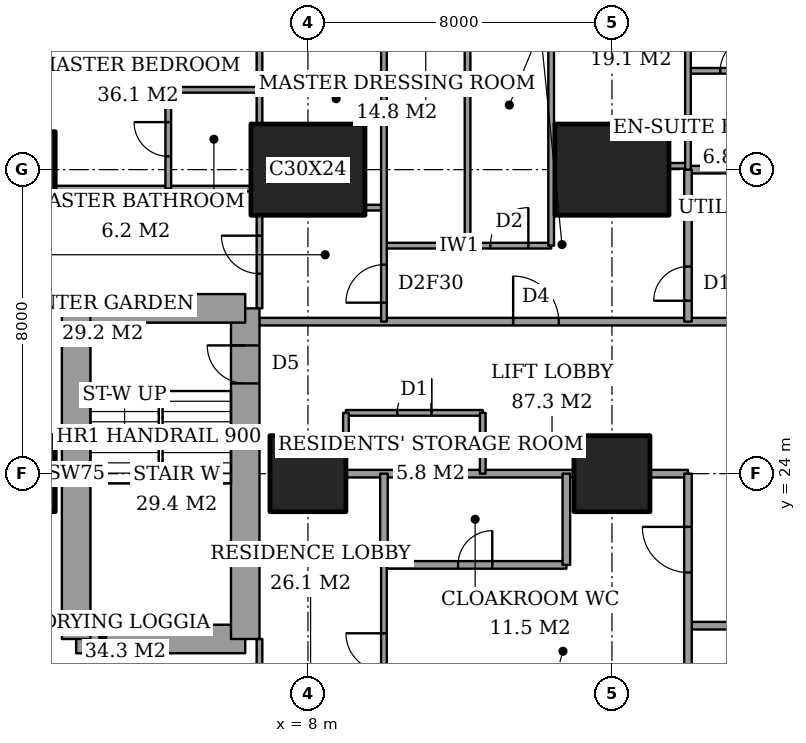
"""IFC4 building model, lengths in metres.
Left out: names, types, materials, properties, quantities, classifications, styles, units other than length and angle.
Written with IfcOpenShell. Run it as: python <this file> out.ifc"""

import sys

from ifc_helpers import new_model, si_unit, direction, frame, frame_2d, origin, origin_2d, place, context, subcontext, project, spatial, rectangle, extrude, element, fill, save


model = new_model("IFC4")
c1 = context("Model", 3, precision=1e-05, world=origin(), true_north=direction((0.0, 1.0)))
c2 = subcontext(c1, "Body", "Model", "MODEL_VIEW")
j1 = project(units=[si_unit("LENGTHUNIT", "METRE"), si_unit("PLANEANGLEUNIT", "RADIAN")], contexts=[c1])
p1 = place(None, origin())
s1 = spatial("IfcSite", under=j1, at=p1, CompositionType="ELEMENT")
p2 = place(p1, origin())
s2 = spatial("IfcBuilding", under=s1, at=p2, CompositionType="ELEMENT")
p3 = place(p2, frame((0.0, 0.0, 153.8)))
s3 = spatial("IfcBuildingStorey", under=s2, at=p3, CompositionType="ELEMENT", Elevation=153.8)
for number, where, z_axis, x_axis in (
    (1, (0.35, 24.0, 0.0), (0.0, 0.0, 1.0), (1.0, 0.0, 0.0)),
    (2, (0.35, 32.0, 0.0), (0.0, 0.0, 1.0), (1.0, 0.0, 0.0)),
    (3, (8.0, 24.0, 0.0), (0.0, 0.0, 1.0), (1.0, 0.0, 0.0)),
):
    element("IfcColumn", number, at=place(p3, frame(where, z_axis=z_axis, x_axis=x_axis)), inside=s3, PredefinedType="COLUMN", context=c2, shape_type="SweptSolid", body=[
        extrude(rectangle(XDim=2.0, YDim=2.0, at=origin_2d()), origin(), (0.0, 0.0, 1.0), 3.6),
    ])
p4 = place(p3, frame((8.0, 32.0, 0.0), z_axis=(0.0, 0.0, 1.0), x_axis=(1.0, 0.0, 0.0)))
e4 = element("IfcColumn", 4, at=p4, inside=s3, PredefinedType="COLUMN", context=c2, shape_type="SweptSolid", body=[
    extrude(rectangle(XDim=3.0, YDim=2.4, at=origin_2d()), origin(), (0.0, 0.0, 1.0), 3.6),
])
p5 = place(p3, frame((16.0, 24.0, 0.0), z_axis=(0.0, 0.0, 1.0), x_axis=(1.0, 0.0, 0.0)))
e5 = element("IfcColumn", 5, at=p5, inside=s3, PredefinedType="COLUMN", context=c2, shape_type="SweptSolid", body=[
    extrude(rectangle(XDim=2.0, YDim=2.0, at=origin_2d()), origin(), (0.0, 0.0, 1.0), 3.6),
])
p6 = place(p3, frame((16.0, 32.0, 0.0), z_axis=(0.0, 0.0, 1.0), x_axis=(1.0, 0.0, 0.0)))
e6 = element("IfcColumn", 6, at=p6, inside=s3, PredefinedType="COLUMN", context=c2, shape_type="SweptSolid", body=[
    extrude(rectangle(XDim=3.0, YDim=2.4, at=origin_2d()), origin(), (0.0, 0.0, 1.0), 3.6),
])
p7 = place(p3, frame((1.9, 19.65, 0.0), z_axis=(0.0, 0.0, 1.0), x_axis=(1.0, 0.0, 0.0)))
e7 = element("IfcWall", 7, at=p7, inside=s3, PredefinedType="SHEAR", context=c2, shape_type="SweptSolid", body=[
    extrude(rectangle(XDim=4.45, YDim=0.75, at=frame_2d((2.225, 0.0))), origin(), (0.0, 0.0, 1.0), 3.6),
])
p8 = place(p3, frame((6.35, 19.65, 0.0), z_axis=(0.0, 0.0, 1.0), x_axis=(0.0, 1.0, 0.0)))
e8 = element("IfcWall", 8, at=p8, inside=s3, PredefinedType="SHEAR", context=c2, shape_type="SweptSolid", body=[
    extrude(rectangle(XDim=8.7, YDim=0.75, at=frame_2d((4.35, 0.0))), origin(), (0.0, 0.0, 1.0), 3.6),
])
p9 = place(p8, frame((6.725, 0.0, 0.0)))
e9 = element("IfcOpeningElement", 9, at=p9, cuts=e8, PredefinedType="OPENING", context=c2, shape_type="SweptSolid", body=[
    extrude(rectangle(XDim=1.0, YDim=2.1, at=frame_2d((0.5, 1.05))), frame((0.0, 0.385, 0.0), z_axis=(0.0, -1.0, 0.0), x_axis=(1.0, 0.0, 0.0)), (0.0, 0.0, 1.0), 0.77),
])
p10 = place(p3, frame((6.35, 28.35, 0.0), z_axis=(0.0, 0.0, 1.0), x_axis=(-1.0, 0.0, 0.0)))
e10 = element("IfcWall", 10, at=p10, inside=s3, PredefinedType="SHEAR", context=c2, shape_type="SweptSolid", body=[
    extrude(rectangle(XDim=4.45, YDim=0.75, at=frame_2d((2.225, 0.0))), origin(), (0.0, 0.0, 1.0), 3.6),
])
p11 = place(p3, frame((1.9, 28.35, 0.0), z_axis=(0.0, 0.0, 1.0), x_axis=(0.0, -1.0, 0.0)))
e11 = element("IfcWall", 11, at=p11, inside=s3, PredefinedType="SHEAR", context=c2, shape_type="SweptSolid", body=[
    extrude(rectangle(XDim=8.7, YDim=0.75, at=frame_2d((4.35, 0.0))), origin(), (0.0, 0.0, 1.0), 3.6),
])
p12 = place(p3, frame((18.0, 20.0, 0.0), z_axis=(0.0, 0.0, 1.0), x_axis=(1.0, 0.0, 0.0)))
e12 = element("IfcWall", 12, at=p12, inside=s3, PredefinedType="PARTITIONING", context=c2, shape_type="SweptSolid", body=[
    extrude(rectangle(XDim=6.0, YDim=0.2, at=frame_2d((3.0, 0.0))), origin(), (0.0, 0.0, 1.0), 3.35),
])
p13 = place(p3, frame((10.0, 21.6, 0.0), z_axis=(0.0, 0.0, 1.0), x_axis=(1.0, 0.0, 0.0)))
e13 = element("IfcWall", 13, at=p13, inside=s3, PredefinedType="PARTITIONING", context=c2, shape_type="SweptSolid", body=[
    extrude(rectangle(XDim=4.8, YDim=0.2, at=frame_2d((2.4, 0.0))), origin(), (0.0, 0.0, 1.0), 3.35),
])
p14 = place(p13, frame((1.95, 0.0, 0.0)))
e14 = element("IfcOpeningElement", 14, at=p14, cuts=e13, PredefinedType="OPENING", context=c2, shape_type="SweptSolid", body=[
    extrude(rectangle(XDim=0.9, YDim=2.1, at=frame_2d((0.45, 1.05))), frame((0.0, 0.11, 0.0), z_axis=(0.0, -1.0, 0.0), x_axis=(1.0, 0.0, 0.0)), (0.0, 0.0, 1.0), 0.22),
])
p15 = place(p3, frame((9.0, 24.0, 0.0), z_axis=(0.0, 0.0, 1.0), x_axis=(1.0, 0.0, 0.0)))
e15 = element("IfcWall", 15, at=p15, inside=s3, PredefinedType="PARTITIONING", context=c2, shape_type="SweptSolid", body=[
    extrude(rectangle(XDim=6.0, YDim=0.2, at=frame_2d((3.0, 0.0))), origin(), (0.0, 0.0, 1.0), 3.35),
])
p16 = place(p3, frame((17.0, 24.0, 0.0), z_axis=(0.0, 0.0, 1.0), x_axis=(1.0, 0.0, 0.0)))
e16 = element("IfcWall", 16, at=p16, inside=s3, PredefinedType="PARTITIONING", context=c2, shape_type="SweptSolid", body=[
    extrude(rectangle(XDim=1.0, YDim=0.2, at=frame_2d((0.5, 0.0))), origin(), (0.0, 0.0, 1.0), 3.35),
])
p17 = place(p3, frame((9.0, 25.6, 0.0), z_axis=(0.0, 0.0, 1.0), x_axis=(1.0, 0.0, 0.0)))
e17 = element("IfcWall", 17, at=p17, inside=s3, PredefinedType="PARTITIONING", context=c2, shape_type="SweptSolid", body=[
    extrude(rectangle(XDim=3.6, YDim=0.15, at=frame_2d((1.8, 0.0))), origin(), (0.0, 0.0, 1.0), 3.35),
])
p18 = place(p17, frame((1.35, 0.0, 0.0)))
e18 = element("IfcOpeningElement", 18, at=p18, cuts=e17, PredefinedType="OPENING", context=c2, shape_type="SweptSolid", body=[
    extrude(rectangle(XDim=0.9, YDim=2.1, at=frame_2d((0.45, 1.05))), frame((0.0, 0.085, 0.0), z_axis=(0.0, -1.0, 0.0), x_axis=(1.0, 0.0, 0.0)), (0.0, 0.0, 1.0), 0.17),
])
p19 = place(p3, frame((6.725, 28.0, 0.0), z_axis=(0.0, 0.0, 1.0), x_axis=(1.0, 0.0, 0.0)))
e19 = element("IfcWall", 19, at=p19, inside=s3, PredefinedType="PARTITIONING", context=c2, shape_type="SweptSolid", body=[
    extrude(rectangle(XDim=17.275, YDim=0.2, at=frame_2d((8.637, 0.0))), origin(), (0.0, 0.0, 1.0), 3.35),
])
p20 = place(p19, frame((6.675, 0.0, 0.0)))
e20 = element("IfcOpeningElement", 20, at=p20, cuts=e19, PredefinedType="OPENING", context=c2, shape_type="SweptSolid", body=[
    extrude(rectangle(XDim=1.2, YDim=2.4, at=frame_2d((0.6, 1.2))), frame((0.0, 0.11, 0.0), z_axis=(0.0, -1.0, 0.0), x_axis=(1.0, 0.0, 0.0)), (0.0, 0.0, 1.0), 0.22),
])
p21 = place(p3, frame((10.0, 30.0, 0.0), z_axis=(0.0, 0.0, 1.0), x_axis=(1.0, 0.0, 0.0)))
e21 = element("IfcWall", 21, at=p21, inside=s3, PredefinedType="PARTITIONING", context=c2, shape_type="SweptSolid", body=[
    extrude(rectangle(XDim=4.4, YDim=0.15, at=frame_2d((2.2, 0.0))), origin(), (0.0, 0.0, 1.0), 3.35),
])
p22 = place(p21, frame((2.8, 0.0, 0.0)))
e22 = element("IfcOpeningElement", 22, at=p22, cuts=e21, PredefinedType="OPENING", context=c2, shape_type="SweptSolid", body=[
    extrude(rectangle(XDim=1.0, YDim=2.1, at=frame_2d((0.5, 1.05))), frame((0.0, 0.085, 0.0), z_axis=(0.0, -1.0, 0.0), x_axis=(1.0, 0.0, 0.0)), (0.0, 0.0, 1.0), 0.17),
])
p23 = place(p3, frame((9.5, 31.0, 0.0), z_axis=(0.0, 0.0, 1.0), x_axis=(1.0, 0.0, 0.0)))
e23 = element("IfcWall", 23, at=p23, inside=s3, PredefinedType="PARTITIONING", context=c2, shape_type="SweptSolid", body=[
    extrude(rectangle(XDim=0.5, YDim=0.15, at=frame_2d((0.25, 0.0))), origin(), (0.0, 0.0, 1.0), 3.35),
])
p24 = place(p3, frame((1.35, 31.5, 0.0), z_axis=(0.0, 0.0, 1.0), x_axis=(1.0, 0.0, 0.0)))
e24 = element("IfcWall", 24, at=p24, inside=s3, PredefinedType="PARTITIONING", context=c2, shape_type="SweptSolid", body=[
    extrude(rectangle(XDim=5.15, YDim=0.15, at=frame_2d((2.575, 0.0))), origin(), (0.0, 0.0, 1.0), 3.35),
])
p25 = place(p3, frame((18.0, 32.0, 0.0), z_axis=(0.0, 0.0, 1.0), x_axis=(1.0, 0.0, 0.0)))
e25 = element("IfcWall", 25, at=p25, inside=s3, PredefinedType="PARTITIONING", context=c2, shape_type="SweptSolid", body=[
    extrude(rectangle(XDim=6.0, YDim=0.2, at=frame_2d((3.0, 0.0))), origin(), (0.0, 0.0, 1.0), 2.634),
])
p26 = place(p3, frame((17.5, 32.1, 0.0), z_axis=(0.0, 0.0, 1.0), x_axis=(1.0, 0.0, 0.0)))
e26 = element("IfcWall", 26, at=p26, inside=s3, PredefinedType="PARTITIONING", context=c2, shape_type="SweptSolid", body=[
    extrude(rectangle(XDim=0.5, YDim=0.15, at=frame_2d((0.25, 0.0))), origin(), (0.0, 0.0, 1.0), 2.634),
])
p27 = place(p3, frame((4.325, 34.1, 0.0), z_axis=(0.0, 0.0, 1.0), x_axis=(1.0, 0.0, 0.0)))
e27 = element("IfcWall", 27, at=p27, inside=s3, PredefinedType="PARTITIONING", context=c2, shape_type="SweptSolid", body=[
    extrude(rectangle(XDim=2.4, YDim=0.15, at=frame_2d((1.2, 0.0))), origin(), (0.0, 0.0, 1.0), 3.35),
])
p28 = place(p3, frame((18.0, 34.6, 0.0), z_axis=(0.0, 0.0, 1.0), x_axis=(1.0, 0.0, 0.0)))
e28 = element("IfcWall", 28, at=p28, inside=s3, PredefinedType="PARTITIONING", context=c2, shape_type="SweptSolid", body=[
    extrude(rectangle(XDim=2.6, YDim=0.15, at=frame_2d((1.3, 0.0))), origin(), (0.0, 0.0, 1.0), 3.35),
])
p29 = place(p28, frame((0.85, 0.0, 0.0)))
e29 = element("IfcOpeningElement", 29, at=p29, cuts=e28, PredefinedType="OPENING", context=c2, shape_type="SweptSolid", body=[
    extrude(rectangle(XDim=0.9, YDim=2.1, at=frame_2d((0.45, 1.05))), frame((0.0, 0.085, 0.0), z_axis=(0.0, -1.0, 0.0), x_axis=(1.0, 0.0, 0.0)), (0.0, 0.0, 1.0), 0.17),
])
p30 = place(p3, frame((4.325, 31.5, 0.0), z_axis=(0.0, 0.0, 1.0), x_axis=(0.0, 1.0, 0.0)))
e30 = element("IfcWall", 30, at=p30, inside=s3, PredefinedType="PARTITIONING", context=c2, shape_type="SweptSolid", body=[
    extrude(rectangle(XDim=2.6, YDim=0.15, at=frame_2d((1.3, 0.0))), origin(), (0.0, 0.0, 1.0), 3.35),
])
p31 = place(p30, frame((0.85, 0.0, 0.0)))
e31 = element("IfcOpeningElement", 31, at=p31, cuts=e30, PredefinedType="OPENING", context=c2, shape_type="SweptSolid", body=[
    extrude(rectangle(XDim=0.9, YDim=2.1, at=frame_2d((0.45, 1.05))), frame((0.0, 0.085, 0.0), z_axis=(0.0, -1.0, 0.0), x_axis=(1.0, 0.0, 0.0)), (0.0, 0.0, 1.0), 0.17),
])
p32 = place(p3, frame((6.725, 17.2, 0.0), z_axis=(0.0, 0.0, 1.0), x_axis=(0.0, 1.0, 0.0)))
e32 = element("IfcWall", 32, at=p32, inside=s3, PredefinedType="PARTITIONING", context=c2, shape_type="SweptSolid", body=[
    extrude(rectangle(XDim=2.45, YDim=0.15, at=frame_2d((1.225, 0.0))), origin(), (0.0, 0.0, 1.0), 3.35),
])
p33 = place(p32, frame((0.587, 0.0, 0.0)))
e33 = element("IfcOpeningElement", 33, at=p33, cuts=e32, PredefinedType="OPENING", context=c2, shape_type="SweptSolid", body=[
    extrude(rectangle(XDim=0.9, YDim=2.1, at=frame_2d((0.45, 1.05))), frame((0.0, 0.085, 0.0), z_axis=(0.0, -1.0, 0.0), x_axis=(1.0, 0.0, 0.0)), (0.0, 0.0, 1.0), 0.17),
])
p34 = place(p3, frame((6.725, 28.35, 0.0), z_axis=(0.0, 0.0, 1.0), x_axis=(0.0, 1.0, 0.0)))
e34 = element("IfcWall", 34, at=p34, inside=s3, PredefinedType="PARTITIONING", context=c2, shape_type="SweptSolid", body=[
    extrude(rectangle(XDim=2.45, YDim=0.15, at=frame_2d((1.225, 0.0))), origin(), (0.0, 0.0, 1.0), 3.35),
])
p35 = place(p34, frame((0.913, 0.0, 0.0)))
e35 = element("IfcOpeningElement", 35, at=p35, cuts=e34, PredefinedType="OPENING", context=c2, shape_type="SweptSolid", body=[
    extrude(rectangle(XDim=1.0, YDim=2.1, at=frame_2d((0.5, 1.05))), frame((0.0, 0.085, 0.0), z_axis=(0.0, -1.0, 0.0), x_axis=(1.0, 0.0, 0.0)), (0.0, 0.0, 1.0), 0.17),
])
p36 = place(p3, frame((6.725, 33.2, 0.0), z_axis=(0.0, 0.0, 1.0), x_axis=(0.0, 1.0, 0.0)))
e36 = element("IfcWall", 36, at=p36, inside=s3, PredefinedType="PARTITIONING", context=c2, shape_type="SweptSolid", body=[
    extrude(rectangle(XDim=4.2, YDim=0.15, at=frame_2d((2.1, 0.0))), origin(), (0.0, 0.0, 1.0), 3.35),
])
p37 = place(p36, frame((2.1, 0.0, 0.0)))
e37 = element("IfcOpeningElement", 37, at=p37, cuts=e36, PredefinedType="OPENING", context=c2, shape_type="SweptSolid", body=[
    extrude(rectangle(XDim=0.9, YDim=2.1, at=frame_2d((0.45, 1.05))), frame((0.0, 0.085, 0.0), z_axis=(0.0, -1.0, 0.0), x_axis=(1.0, 0.0, 0.0)), (0.0, 0.0, 1.0), 0.17),
])
p38 = place(p3, frame((9.0, 25.0, 0.0), z_axis=(0.0, 0.0, 1.0), x_axis=(0.0, 1.0, 0.0)))
e38 = element("IfcWall", 38, at=p38, inside=s3, PredefinedType="PARTITIONING", context=c2, shape_type="SweptSolid", body=[
    extrude(rectangle(XDim=0.6, YDim=0.15, at=frame_2d((0.3, 0.0))), origin(), (0.0, 0.0, 1.0), 3.35),
])
p39 = place(p3, frame((10.0, 21.6, 0.0), z_axis=(0.0, 0.0, 1.0), x_axis=(0.0, 1.0, 0.0)))
e39 = element("IfcWall", 39, at=p39, inside=s3, PredefinedType="PARTITIONING", context=c2, shape_type="SweptSolid", body=[
    extrude(rectangle(XDim=2.4, YDim=0.2, at=frame_2d((1.2, 0.0))), origin(), (0.0, 0.0, 1.0), 3.35),
])
p40 = place(p3, frame((10.0, 14.0, 0.0), z_axis=(0.0, 0.0, 1.0), x_axis=(0.0, 1.0, 0.0)))
e40 = element("IfcWall", 40, at=p40, inside=s3, PredefinedType="PARTITIONING", context=c2, shape_type="SweptSolid", body=[
    extrude(rectangle(XDim=7.6, YDim=0.15, at=frame_2d((3.8, 0.0))), origin(), (0.0, 0.0, 1.0), 3.35),
])
p41 = place(p40, frame((4.8, 0.0, 0.0)))
e41 = element("IfcOpeningElement", 41, at=p41, cuts=e40, PredefinedType="OPENING", context=c2, shape_type="SweptSolid", body=[
    extrude(rectangle(XDim=1.0, YDim=2.1, at=frame_2d((0.5, 1.05))), frame((0.0, 0.085, 0.0), z_axis=(0.0, -1.0, 0.0), x_axis=(1.0, 0.0, 0.0)), (0.0, 0.0, 1.0), 0.17),
])
p42 = place(p3, frame((10.0, 28.0, 0.0), z_axis=(0.0, 0.0, 1.0), x_axis=(0.0, 1.0, 0.0)))
e42 = element("IfcWall", 42, at=p42, inside=s3, PredefinedType="PARTITIONING", context=c2, shape_type="SweptSolid", body=[
    extrude(rectangle(XDim=9.4, YDim=0.15, at=frame_2d((4.7, 0.0))), origin(), (0.0, 0.0, 1.0), 3.35),
])
p43 = place(p42, frame((0.5, 0.0, 0.0)))
e43 = element("IfcOpeningElement", 43, at=p43, cuts=e42, PredefinedType="OPENING", context=c2, shape_type="SweptSolid", body=[
    extrude(rectangle(XDim=1.0, YDim=2.1, at=frame_2d((0.5, 1.05))), frame((0.0, 0.085, 0.0), z_axis=(0.0, -1.0, 0.0), x_axis=(1.0, 0.0, 0.0)), (0.0, 0.0, 1.0), 0.17),
])
p44 = place(p3, frame((12.2, 30.0, 0.0), z_axis=(0.0, 0.0, 1.0), x_axis=(0.0, 1.0, 0.0)))
e44 = element("IfcWall", 44, at=p44, inside=s3, PredefinedType="PARTITIONING", context=c2, shape_type="SweptSolid", body=[
    extrude(rectangle(XDim=7.4, YDim=0.15, at=frame_2d((3.7, 0.0))), origin(), (0.0, 0.0, 1.0), 3.35),
])
p45 = place(p3, frame((12.6, 24.0, 0.0), z_axis=(0.0, 0.0, 1.0), x_axis=(0.0, 1.0, 0.0)))
e45 = element("IfcWall", 45, at=p45, inside=s3, PredefinedType="PARTITIONING", context=c2, shape_type="SweptSolid", body=[
    extrude(rectangle(XDim=1.6, YDim=0.15, at=frame_2d((0.8, 0.0))), origin(), (0.0, 0.0, 1.0), 3.35),
])
p46 = place(p3, frame((14.4, 30.0, 0.0), z_axis=(0.0, 0.0, 1.0), x_axis=(0.0, 1.0, 0.0)))
e46 = element("IfcWall", 46, at=p46, inside=s3, PredefinedType="PARTITIONING", context=c2, shape_type="SweptSolid", body=[
    extrude(rectangle(XDim=7.4, YDim=0.15, at=frame_2d((3.7, 0.0))), origin(), (0.0, 0.0, 1.0), 3.35),
])
p47 = place(p3, frame((14.8, 21.6, 0.0), z_axis=(0.0, 0.0, 1.0), x_axis=(0.0, 1.0, 0.0)))
e47 = element("IfcWall", 47, at=p47, inside=s3, PredefinedType="PARTITIONING", context=c2, shape_type="SweptSolid", body=[
    extrude(rectangle(XDim=2.4, YDim=0.2, at=frame_2d((1.2, 0.0))), origin(), (0.0, 0.0, 1.0), 3.35),
])
p48 = place(p3, frame((18.0, 17.0, 0.0), z_axis=(0.0, 0.0, 1.0), x_axis=(0.0, 1.0, 0.0)))
e48 = element("IfcWall", 48, at=p48, inside=s3, PredefinedType="PARTITIONING", context=c2, shape_type="SweptSolid", body=[
    extrude(rectangle(XDim=7.0, YDim=0.2, at=frame_2d((3.5, 0.0))), origin(), (0.0, 0.0, 1.0), 3.35),
])
p49 = place(p48, frame((4.4, 0.0, 0.0)))
e49 = element("IfcOpeningElement", 49, at=p49, cuts=e48, PredefinedType="OPENING", context=c2, shape_type="SweptSolid", body=[
    extrude(rectangle(XDim=1.2, YDim=2.4, at=frame_2d((0.6, 1.2))), frame((0.0, 0.11, 0.0), z_axis=(0.0, -1.0, 0.0), x_axis=(1.0, 0.0, 0.0)), (0.0, 0.0, 1.0), 0.22),
])
p50 = place(p48, frame((1.05, 0.0, 0.0)))
e50 = element("IfcOpeningElement", 50, at=p50, cuts=e48, PredefinedType="OPENING", context=c2, shape_type="SweptSolid", body=[
    extrude(rectangle(XDim=0.9, YDim=2.1, at=frame_2d((0.45, 1.05))), frame((0.0, 0.11, 0.0), z_axis=(0.0, -1.0, 0.0), x_axis=(1.0, 0.0, 0.0)), (0.0, 0.0, 1.0), 0.22),
])
p51 = place(p3, frame((18.0, 28.0, 0.0), z_axis=(0.0, 0.0, 1.0), x_axis=(0.0, 1.0, 0.0)))
e51 = element("IfcWall", 51, at=p51, inside=s3, PredefinedType="PARTITIONING", context=c2, shape_type="SweptSolid", body=[
    extrude(rectangle(XDim=4.0, YDim=0.2, at=frame_2d((2.0, 0.0))), origin(), (0.0, 0.0, 1.0), 3.35),
])
p52 = place(p51, frame((0.55, 0.0, 0.0)))
e52 = element("IfcOpeningElement", 52, at=p52, cuts=e51, PredefinedType="OPENING", context=c2, shape_type="SweptSolid", body=[
    extrude(rectangle(XDim=0.9, YDim=2.1, at=frame_2d((0.45, 1.05))), frame((0.0, 0.11, 0.0), z_axis=(0.0, -1.0, 0.0), x_axis=(1.0, 0.0, 0.0)), (0.0, 0.0, 1.0), 0.22),
])
p53 = place(p3, frame((18.0, 32.0, 0.0), z_axis=(0.0, 0.0, 1.0), x_axis=(0.0, 1.0, 0.0)))
e53 = element("IfcWall", 53, at=p53, inside=s3, PredefinedType="PARTITIONING", context=c2, shape_type="SweptSolid", body=[
    extrude(rectangle(XDim=5.4, YDim=0.15, at=frame_2d((2.7, 0.0))), origin(), (0.0, 0.0, 1.0), 3.35),
])
p54 = place(p41, origin())
e54 = element("IfcDoor", 54, at=p54, inside=s3, OperationType="SINGLE_SWING_LEFT", PredefinedType="DOOR", context=c2, shape_type="SweptSolid", body=[
    extrude(rectangle(XDim=1.0, YDim=2.1, at=frame_2d((0.5, 1.05))), frame((0.0, 0.025, 0.0), z_axis=(0.0, -1.0, 0.0), x_axis=(1.0, 0.0, 0.0)), (0.0, 0.0, 1.0), 0.05),
])
fill(e41, e54)
p55 = place(p14, origin())
e55 = element("IfcDoor", 55, at=p55, inside=s3, OperationType="SINGLE_SWING_LEFT", PredefinedType="DOOR", context=c2, shape_type="SweptSolid", body=[
    extrude(rectangle(XDim=0.9, YDim=2.1, at=frame_2d((0.45, 1.05))), frame((0.0, 0.025, 0.0), z_axis=(0.0, -1.0, 0.0), x_axis=(1.0, 0.0, 0.0)), (0.0, 0.0, 1.0), 0.05),
])
fill(e14, e55)
p56 = place(p49, origin())
e56 = element("IfcDoor", 56, at=p56, inside=s3, OperationType="SINGLE_SWING_LEFT", PredefinedType="DOOR", context=c2, shape_type="SweptSolid", body=[
    extrude(rectangle(XDim=1.2, YDim=2.4, at=frame_2d((0.6, 1.2))), frame((0.0, 0.025, 0.0), z_axis=(0.0, -1.0, 0.0), x_axis=(1.0, 0.0, 0.0)), (0.0, 0.0, 1.0), 0.05),
])
fill(e49, e56)
p57 = place(p31, origin())
e57 = element("IfcDoor", 57, at=p57, inside=s3, OperationType="SINGLE_SWING_LEFT", PredefinedType="DOOR", context=c2, shape_type="SweptSolid", body=[
    extrude(rectangle(XDim=0.9, YDim=2.1, at=frame_2d((0.45, 1.05))), frame((0.0, 0.025, 0.0), z_axis=(0.0, -1.0, 0.0), x_axis=(1.0, 0.0, 0.0)), (0.0, 0.0, 1.0), 0.05),
])
fill(e31, e57)
p58 = place(p35, origin())
e58 = element("IfcDoor", 58, at=p58, inside=s3, OperationType="SINGLE_SWING_LEFT", PredefinedType="DOOR", context=c2, shape_type="SweptSolid", body=[
    extrude(rectangle(XDim=1.0, YDim=2.1, at=frame_2d((0.5, 1.05))), frame((0.0, 0.025, 0.0), z_axis=(0.0, -1.0, 0.0), x_axis=(1.0, 0.0, 0.0)), (0.0, 0.0, 1.0), 0.05),
])
fill(e35, e58)
p59 = place(p43, origin())
e59 = element("IfcDoor", 59, at=p59, inside=s3, OperationType="SINGLE_SWING_RIGHT", PredefinedType="DOOR", context=c2, shape_type="SweptSolid", body=[
    extrude(rectangle(XDim=1.0, YDim=2.1, at=frame_2d((0.5, 1.05))), frame((0.0, 0.025, 0.0), z_axis=(0.0, -1.0, 0.0), x_axis=(1.0, 0.0, 0.0)), (0.0, 0.0, 1.0), 0.05),
])
fill(e43, e59)
p60 = place(p20, origin())
e60 = element("IfcDoor", 60, at=p60, inside=s3, OperationType="SINGLE_SWING_RIGHT", PredefinedType="DOOR", context=c2, shape_type="SweptSolid", body=[
    extrude(rectangle(XDim=1.2, YDim=2.4, at=frame_2d((0.6, 1.2))), frame((0.0, 0.025, 0.0), z_axis=(0.0, -1.0, 0.0), x_axis=(1.0, 0.0, 0.0)), (0.0, 0.0, 1.0), 0.05),
])
fill(e20, e60)
p61 = place(p22, origin())
e61 = element("IfcDoor", 61, at=p61, inside=s3, OperationType="SINGLE_SWING_LEFT", PredefinedType="DOOR", context=c2, shape_type="SweptSolid", body=[
    extrude(rectangle(XDim=1.0, YDim=2.1, at=frame_2d((0.5, 1.05))), frame((0.0, 0.025, 0.0), z_axis=(0.0, -1.0, 0.0), x_axis=(1.0, 0.0, 0.0)), (0.0, 0.0, 1.0), 0.05),
])
fill(e22, e61)
p62 = place(p29, origin())
e62 = element("IfcDoor", 62, at=p62, inside=s3, OperationType="SINGLE_SWING_LEFT", PredefinedType="DOOR", context=c2, shape_type="SweptSolid", body=[
    extrude(rectangle(XDim=0.9, YDim=2.1, at=frame_2d((0.45, 1.05))), frame((0.0, 0.025, 0.0), z_axis=(0.0, -1.0, 0.0), x_axis=(1.0, 0.0, 0.0)), (0.0, 0.0, 1.0), 0.05),
])
fill(e29, e62)
p63 = place(p52, origin())
e63 = element("IfcDoor", 63, at=p63, inside=s3, OperationType="SINGLE_SWING_RIGHT", PredefinedType="DOOR", context=c2, shape_type="SweptSolid", body=[
    extrude(rectangle(XDim=0.9, YDim=2.1, at=frame_2d((0.45, 1.05))), frame((0.0, 0.025, 0.0), z_axis=(0.0, -1.0, 0.0), x_axis=(1.0, 0.0, 0.0)), (0.0, 0.0, 1.0), 0.05),
])
fill(e52, e63)
p64 = place(p18, origin())
e64 = element("IfcDoor", 64, at=p64, inside=s3, OperationType="SINGLE_SWING_LEFT", PredefinedType="DOOR", context=c2, shape_type="SweptSolid", body=[
    extrude(rectangle(XDim=0.9, YDim=2.1, at=frame_2d((0.45, 1.05))), frame((0.0, 0.025, 0.0), z_axis=(0.0, -1.0, 0.0), x_axis=(1.0, 0.0, 0.0)), (0.0, 0.0, 1.0), 0.05),
])
fill(e18, e64)
p65 = place(p9, origin())
e65 = element("IfcDoor", 65, at=p65, inside=s3, OperationType="SINGLE_SWING_LEFT", PredefinedType="DOOR", context=c2, shape_type="SweptSolid", body=[
    extrude(rectangle(XDim=1.0, YDim=2.1, at=frame_2d((0.5, 1.05))), frame((0.0, 0.025, 0.0), z_axis=(0.0, -1.0, 0.0), x_axis=(1.0, 0.0, 0.0)), (0.0, 0.0, 1.0), 0.05),
])
fill(e9, e65)
save(model, sys.argv[1])
